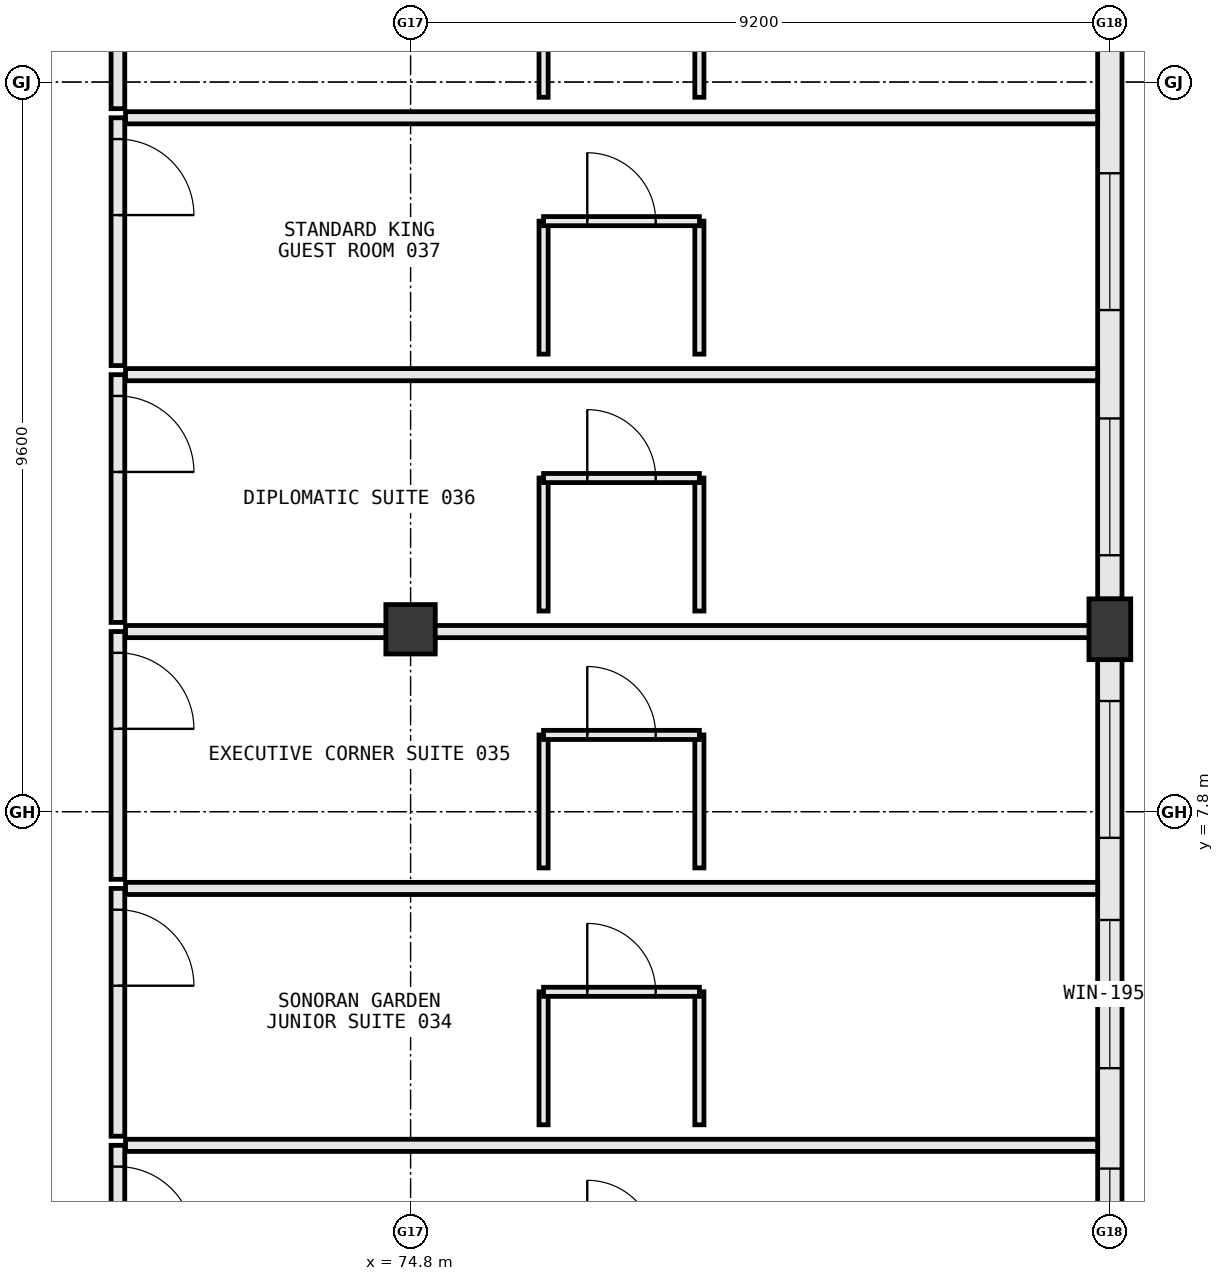
"""IFC4 building model, lengths in metres.
Left out: names, types, materials, properties, quantities, classifications, styles, units other than length and angle.
Written with IfcOpenShell. Run it as: python <this file> out.ifc"""

import sys

from ifc_helpers import new_model, si_unit, direction, frame, frame_2d, origin, origin_2d, place, context, subcontext, project, spatial, rectangle, extrude, element, fill, save


model = new_model("IFC4")
c1 = context("Model", 3, precision=1e-05, world=origin(), true_north=direction((0.0, 1.0)))
c2 = subcontext(c1, "Body", "Model", "MODEL_VIEW")
j1 = project(units=[si_unit("LENGTHUNIT", "METRE"), si_unit("PLANEANGLEUNIT", "RADIAN")], contexts=[c1])
p1 = place(None, origin())
s1 = spatial("IfcSite", under=j1, at=p1, CompositionType="ELEMENT")
p2 = place(p1, origin())
s2 = spatial("IfcBuilding", under=s1, at=p2, CompositionType="ELEMENT")
p3 = place(p2, frame((0.0, 0.0, 10.8)))
s3 = spatial("IfcBuildingStorey", under=s2, at=p3, CompositionType="ELEMENT", Elevation=10.8)
p4 = place(p3, frame((74.8, 10.2, 0.0), z_axis=(0.0, 0.0, 1.0), x_axis=(1.0, 0.0, 0.0)))
e1 = element("IfcColumn", 1, at=p4, inside=s3, PredefinedType="COLUMN", context=c2, shape_type="SweptSolid", body=[
    extrude(rectangle(XDim=0.65, YDim=0.65, at=origin_2d()), origin(), (0.0, 0.0, 1.0), 5.4),
])
p5 = place(p3, frame((84.0, 10.2, 0.0), z_axis=(0.0, 0.0, 1.0), x_axis=(1.0, 0.0, 0.0)))
e2 = element("IfcColumn", 2, at=p5, inside=s3, PredefinedType="PILASTER", context=c2, shape_type="SweptSolid", body=[
    extrude(rectangle(XDim=0.55, YDim=0.8, at=origin_2d()), origin(), (0.0, 0.0, 1.0), 5.4),
])
p6 = place(p3, frame((84.0, 0.998, 0.0), z_axis=(0.0, 0.0, 1.0), x_axis=(0.0, 1.0, 0.0)))
e3 = element("IfcWall", 3, at=p6, inside=s3, PredefinedType="STANDARD", context=c2, shape_type="SweptSolid", body=[
    extrude(rectangle(XDim=8.804, YDim=0.32, at=frame_2d((4.402, 0.0))), origin(), (0.0, 0.0, 1.0), 4.332),
])
p7 = place(p6, frame((3.427, 0.0, 0.85)))
e4 = element("IfcOpeningElement", 4, at=p7, cuts=e3, PredefinedType="OPENING", context=c2, shape_type="SweptSolid", body=[
    extrude(rectangle(XDim=1.95, YDim=1.9, at=frame_2d((0.975, 0.95))), frame((0.0, 0.172, 0.0), z_axis=(0.0, -1.0, 0.0), x_axis=(1.0, 0.0, 0.0)), (0.0, 0.0, 1.0), 0.344),
])
p8 = place(p6, frame((0.306, 0.0, 0.85)))
e5 = element("IfcOpeningElement", 5, at=p8, cuts=e3, PredefinedType="OPENING", context=c2, shape_type="SweptSolid", body=[
    extrude(rectangle(XDim=1.8, YDim=1.85, at=frame_2d((0.9, 0.925))), frame((0.0, 0.172, 0.0), z_axis=(0.0, -1.0, 0.0), x_axis=(1.0, 0.0, 0.0)), (0.0, 0.0, 1.0), 0.344),
])
p9 = place(p6, frame((6.458, 0.0, 0.85)))
e6 = element("IfcOpeningElement", 6, at=p9, cuts=e3, PredefinedType="OPENING", context=c2, shape_type="SweptSolid", body=[
    extrude(rectangle(XDim=1.8, YDim=1.85, at=frame_2d((0.9, 0.925))), frame((0.0, 0.172, 0.0), z_axis=(0.0, -1.0, 0.0), x_axis=(1.0, 0.0, 0.0)), (0.0, 0.0, 1.0), 0.344),
])
p10 = place(p3, frame((84.0, 10.598, 0.0), z_axis=(0.0, 0.0, 1.0), x_axis=(0.0, 1.0, 0.0)))
e7 = element("IfcWall", 7, at=p10, inside=s3, PredefinedType="STANDARD", context=c2, shape_type="SweptSolid", body=[
    extrude(rectangle(XDim=7.604, YDim=0.32, at=frame_2d((3.802, 0.0))), origin(), (0.0, 0.0, 1.0), 4.332),
])
p11 = place(p10, frame((0.576, 0.0, 0.85)))
e8 = element("IfcOpeningElement", 8, at=p11, cuts=e7, PredefinedType="OPENING", context=c2, shape_type="SweptSolid", body=[
    extrude(rectangle(XDim=1.8, YDim=1.85, at=frame_2d((0.9, 0.925))), frame((0.0, 0.172, 0.0), z_axis=(0.0, -1.0, 0.0), x_axis=(1.0, 0.0, 0.0)), (0.0, 0.0, 1.0), 0.344),
])
p12 = place(p10, frame((3.802, 0.0, 0.85)))
e9 = element("IfcOpeningElement", 9, at=p12, cuts=e7, PredefinedType="OPENING", context=c2, shape_type="SweptSolid", body=[
    extrude(rectangle(XDim=1.8, YDim=1.85, at=frame_2d((0.9, 0.925))), frame((0.0, 0.172, 0.0), z_axis=(0.0, -1.0, 0.0), x_axis=(1.0, 0.0, 0.0)), (0.0, 0.0, 1.0), 0.344),
])
p13 = place(p3, frame((70.95, 3.41, 0.0), z_axis=(0.0, 0.0, 1.0), x_axis=(0.0, -1.0, 0.0)))
e10 = element("IfcWall", 10, at=p13, inside=s3, PredefinedType="PARTITIONING", context=c2, shape_type="SweptSolid", body=[
    extrude(rectangle(XDim=3.26, YDim=0.18, at=frame_2d((1.63, 0.0))), origin(), (0.0, 0.0, 1.0), 4.8),
])
p14 = place(p13, frame((0.28, 0.0, 0.0)))
e11 = element("IfcOpeningElement", 11, at=p14, cuts=e10, PredefinedType="OPENING", context=c2, shape_type="SweptSolid", body=[
    extrude(rectangle(XDim=1.0, YDim=2.2, at=frame_2d((0.5, 1.1))), frame((0.0, 0.102, 0.0), z_axis=(0.0, -1.0, 0.0), x_axis=(1.0, 0.0, 0.0)), (0.0, 0.0, 1.0), 0.204),
])
p15 = place(p3, frame((71.05, 3.41, 0.0), z_axis=(0.0, 0.0, 1.0), x_axis=(1.0, 0.0, 0.0)))
e12 = element("IfcWall", 12, at=p15, inside=s3, PredefinedType="PARTITIONING", context=c2, shape_type="SweptSolid", body=[
    extrude(rectangle(XDim=12.79, YDim=0.16, at=frame_2d((6.395, 0.0))), origin(), (0.0, 0.0, 1.0), 4.8),
])
p16 = place(p3, frame((70.95, 6.79, 0.0), z_axis=(0.0, 0.0, 1.0), x_axis=(0.0, -1.0, 0.0)))
e13 = element("IfcWall", 13, at=p16, inside=s3, PredefinedType="PARTITIONING", context=c2, shape_type="SweptSolid", body=[
    extrude(rectangle(XDim=3.26, YDim=0.18, at=frame_2d((1.63, 0.0))), origin(), (0.0, 0.0, 1.0), 4.8),
])
p17 = place(p16, frame((0.28, 0.0, 0.0)))
e14 = element("IfcOpeningElement", 14, at=p17, cuts=e13, PredefinedType="OPENING", context=c2, shape_type="SweptSolid", body=[
    extrude(rectangle(XDim=1.0, YDim=2.2, at=frame_2d((0.5, 1.1))), frame((0.0, 0.102, 0.0), z_axis=(0.0, -1.0, 0.0), x_axis=(1.0, 0.0, 0.0)), (0.0, 0.0, 1.0), 0.204),
])
p18 = place(p3, frame((71.05, 6.79, 0.0), z_axis=(0.0, 0.0, 1.0), x_axis=(1.0, 0.0, 0.0)))
e15 = element("IfcWall", 15, at=p18, inside=s3, PredefinedType="PARTITIONING", context=c2, shape_type="SweptSolid", body=[
    extrude(rectangle(XDim=12.79, YDim=0.16, at=frame_2d((6.395, 0.0))), origin(), (0.0, 0.0, 1.0), 4.8),
])
for number, where, z_axis, x_axis in (
    (16, (76.55, 3.68, 0.0), (0.0, 0.0, 1.0), (0.0, 1.0, 0.0)),
    (17, (78.6, 3.68, 0.0), (0.0, 0.0, 1.0), (0.0, 1.0, 0.0)),
):
    element("IfcWall", number, at=place(p3, frame(where, z_axis=z_axis, x_axis=x_axis)), inside=s3, PredefinedType="PARTITIONING", context=c2, shape_type="SweptSolid", body=[
        extrude(rectangle(XDim=1.75, YDim=0.12, at=frame_2d((0.875, 0.0))), origin(), (0.0, 0.0, 1.0), 4.8),
    ])
p19 = place(p3, frame((76.55, 5.43, 0.0), z_axis=(0.0, 0.0, 1.0), x_axis=(1.0, 0.0, 0.0)))
e18 = element("IfcWall", 18, at=p19, inside=s3, PredefinedType="PARTITIONING", context=c2, shape_type="SweptSolid", body=[
    extrude(rectangle(XDim=2.05, YDim=0.12, at=frame_2d((1.025, 0.0))), origin(), (0.0, 0.0, 1.0), 4.8),
])
p20 = place(p19, frame((0.575, 0.0, 0.0)))
e19 = element("IfcOpeningElement", 19, at=p20, cuts=e18, PredefinedType="OPENING", context=c2, shape_type="SweptSolid", body=[
    extrude(rectangle(XDim=0.9, YDim=2.15, at=frame_2d((0.45, 1.075))), frame((0.0, 0.072, 0.0), z_axis=(0.0, -1.0, 0.0), x_axis=(1.0, 0.0, 0.0)), (0.0, 0.0, 1.0), 0.144),
])
p21 = place(p3, frame((70.95, 10.17, 0.0), z_axis=(0.0, 0.0, 1.0), x_axis=(0.0, -1.0, 0.0)))
e20 = element("IfcWall", 20, at=p21, inside=s3, PredefinedType="PARTITIONING", context=c2, shape_type="SweptSolid", body=[
    extrude(rectangle(XDim=3.26, YDim=0.18, at=frame_2d((1.63, 0.0))), origin(), (0.0, 0.0, 1.0), 4.8),
])
p22 = place(p21, frame((0.28, 0.0, 0.0)))
e21 = element("IfcOpeningElement", 21, at=p22, cuts=e20, PredefinedType="OPENING", context=c2, shape_type="SweptSolid", body=[
    extrude(rectangle(XDim=1.0, YDim=2.2, at=frame_2d((0.5, 1.1))), frame((0.0, 0.102, 0.0), z_axis=(0.0, -1.0, 0.0), x_axis=(1.0, 0.0, 0.0)), (0.0, 0.0, 1.0), 0.204),
])
p23 = place(p3, frame((71.05, 10.17, 0.0), z_axis=(0.0, 0.0, 1.0), x_axis=(1.0, 0.0, 0.0)))
e22 = element("IfcWall", 22, at=p23, inside=s3, PredefinedType="PARTITIONING", context=c2, shape_type="SweptSolid", body=[
    extrude(rectangle(XDim=12.79, YDim=0.16, at=frame_2d((6.395, 0.0))), origin(), (0.0, 0.0, 1.0), 4.175),
])
for number, where, z_axis, x_axis in (
    (23, (76.55, 7.06, 0.0), (0.0, 0.0, 1.0), (0.0, 1.0, 0.0)),
    (24, (78.6, 7.06, 0.0), (0.0, 0.0, 1.0), (0.0, 1.0, 0.0)),
):
    element("IfcWall", number, at=place(p3, frame(where, z_axis=z_axis, x_axis=x_axis)), inside=s3, PredefinedType="PARTITIONING", context=c2, shape_type="SweptSolid", body=[
        extrude(rectangle(XDim=1.75, YDim=0.12, at=frame_2d((0.875, 0.0))), origin(), (0.0, 0.0, 1.0), 4.8),
    ])
p24 = place(p3, frame((76.55, 8.81, 0.0), z_axis=(0.0, 0.0, 1.0), x_axis=(1.0, 0.0, 0.0)))
e25 = element("IfcWall", 25, at=p24, inside=s3, PredefinedType="PARTITIONING", context=c2, shape_type="SweptSolid", body=[
    extrude(rectangle(XDim=2.05, YDim=0.12, at=frame_2d((1.025, 0.0))), origin(), (0.0, 0.0, 1.0), 4.8),
])
p25 = place(p24, frame((0.575, 0.0, 0.0)))
e26 = element("IfcOpeningElement", 26, at=p25, cuts=e25, PredefinedType="OPENING", context=c2, shape_type="SweptSolid", body=[
    extrude(rectangle(XDim=0.9, YDim=2.15, at=frame_2d((0.45, 1.075))), frame((0.0, 0.072, 0.0), z_axis=(0.0, -1.0, 0.0), x_axis=(1.0, 0.0, 0.0)), (0.0, 0.0, 1.0), 0.144),
])
p26 = place(p3, frame((70.95, 13.55, 0.0), z_axis=(0.0, 0.0, 1.0), x_axis=(0.0, -1.0, 0.0)))
e27 = element("IfcWall", 27, at=p26, inside=s3, PredefinedType="PARTITIONING", context=c2, shape_type="SweptSolid", body=[
    extrude(rectangle(XDim=3.26, YDim=0.18, at=frame_2d((1.63, 0.0))), origin(), (0.0, 0.0, 1.0), 4.8),
])
p27 = place(p26, frame((0.28, 0.0, 0.0)))
e28 = element("IfcOpeningElement", 28, at=p27, cuts=e27, PredefinedType="OPENING", context=c2, shape_type="SweptSolid", body=[
    extrude(rectangle(XDim=1.0, YDim=2.2, at=frame_2d((0.5, 1.1))), frame((0.0, 0.102, 0.0), z_axis=(0.0, -1.0, 0.0), x_axis=(1.0, 0.0, 0.0)), (0.0, 0.0, 1.0), 0.204),
])
p28 = place(p3, frame((71.05, 13.55, 0.0), z_axis=(0.0, 0.0, 1.0), x_axis=(1.0, 0.0, 0.0)))
e29 = element("IfcWall", 29, at=p28, inside=s3, PredefinedType="PARTITIONING", context=c2, shape_type="SweptSolid", body=[
    extrude(rectangle(XDim=12.79, YDim=0.16, at=frame_2d((6.395, 0.0))), origin(), (0.0, 0.0, 1.0), 4.8),
])
for number, where, z_axis, x_axis in (
    (30, (76.55, 10.44, 0.0), (0.0, 0.0, 1.0), (0.0, 1.0, 0.0)),
    (31, (78.6, 10.44, 0.0), (0.0, 0.0, 1.0), (0.0, 1.0, 0.0)),
):
    element("IfcWall", number, at=place(p3, frame(where, z_axis=z_axis, x_axis=x_axis)), inside=s3, PredefinedType="PARTITIONING", context=c2, shape_type="SweptSolid", body=[
        extrude(rectangle(XDim=1.75, YDim=0.12, at=frame_2d((0.875, 0.0))), origin(), (0.0, 0.0, 1.0), 4.8),
    ])
p29 = place(p3, frame((76.55, 12.19, 0.0), z_axis=(0.0, 0.0, 1.0), x_axis=(1.0, 0.0, 0.0)))
e32 = element("IfcWall", 32, at=p29, inside=s3, PredefinedType="PARTITIONING", context=c2, shape_type="SweptSolid", body=[
    extrude(rectangle(XDim=2.05, YDim=0.12, at=frame_2d((1.025, 0.0))), origin(), (0.0, 0.0, 1.0), 4.8),
])
p30 = place(p29, frame((0.575, 0.0, 0.0)))
e33 = element("IfcOpeningElement", 33, at=p30, cuts=e32, PredefinedType="OPENING", context=c2, shape_type="SweptSolid", body=[
    extrude(rectangle(XDim=0.9, YDim=2.15, at=frame_2d((0.45, 1.075))), frame((0.0, 0.072, 0.0), z_axis=(0.0, -1.0, 0.0), x_axis=(1.0, 0.0, 0.0)), (0.0, 0.0, 1.0), 0.144),
])
p31 = place(p3, frame((70.95, 16.93, 0.0), z_axis=(0.0, 0.0, 1.0), x_axis=(0.0, -1.0, 0.0)))
e34 = element("IfcWall", 34, at=p31, inside=s3, PredefinedType="PARTITIONING", context=c2, shape_type="SweptSolid", body=[
    extrude(rectangle(XDim=3.26, YDim=0.18, at=frame_2d((1.63, 0.0))), origin(), (0.0, 0.0, 1.0), 4.8),
])
p32 = place(p31, frame((0.28, 0.0, 0.0)))
e35 = element("IfcOpeningElement", 35, at=p32, cuts=e34, PredefinedType="OPENING", context=c2, shape_type="SweptSolid", body=[
    extrude(rectangle(XDim=1.0, YDim=2.2, at=frame_2d((0.5, 1.1))), frame((0.0, 0.102, 0.0), z_axis=(0.0, -1.0, 0.0), x_axis=(1.0, 0.0, 0.0)), (0.0, 0.0, 1.0), 0.204),
])
p33 = place(p3, frame((71.05, 16.93, 0.0), z_axis=(0.0, 0.0, 1.0), x_axis=(1.0, 0.0, 0.0)))
e36 = element("IfcWall", 36, at=p33, inside=s3, PredefinedType="PARTITIONING", context=c2, shape_type="SweptSolid", body=[
    extrude(rectangle(XDim=12.79, YDim=0.16, at=frame_2d((6.395, 0.0))), origin(), (0.0, 0.0, 1.0), 4.8),
])
for number, where, z_axis, x_axis in (
    (37, (76.55, 13.82, 0.0), (0.0, 0.0, 1.0), (0.0, 1.0, 0.0)),
    (38, (78.6, 13.82, 0.0), (0.0, 0.0, 1.0), (0.0, 1.0, 0.0)),
):
    element("IfcWall", number, at=place(p3, frame(where, z_axis=z_axis, x_axis=x_axis)), inside=s3, PredefinedType="PARTITIONING", context=c2, shape_type="SweptSolid", body=[
        extrude(rectangle(XDim=1.75, YDim=0.12, at=frame_2d((0.875, 0.0))), origin(), (0.0, 0.0, 1.0), 4.8),
    ])
p34 = place(p3, frame((76.55, 15.57, 0.0), z_axis=(0.0, 0.0, 1.0), x_axis=(1.0, 0.0, 0.0)))
e39 = element("IfcWall", 39, at=p34, inside=s3, PredefinedType="PARTITIONING", context=c2, shape_type="SweptSolid", body=[
    extrude(rectangle(XDim=2.05, YDim=0.12, at=frame_2d((1.025, 0.0))), origin(), (0.0, 0.0, 1.0), 4.8),
])
p35 = place(p34, frame((0.575, 0.0, 0.0)))
e40 = element("IfcOpeningElement", 40, at=p35, cuts=e39, PredefinedType="OPENING", context=c2, shape_type="SweptSolid", body=[
    extrude(rectangle(XDim=0.9, YDim=2.15, at=frame_2d((0.45, 1.075))), frame((0.0, 0.072, 0.0), z_axis=(0.0, -1.0, 0.0), x_axis=(1.0, 0.0, 0.0)), (0.0, 0.0, 1.0), 0.144),
])
p36 = place(p3, frame((70.95, 20.31, 0.0), z_axis=(0.0, 0.0, 1.0), x_axis=(0.0, -1.0, 0.0)))
e41 = element("IfcWall", 41, at=p36, inside=s3, PredefinedType="PARTITIONING", context=c2, shape_type="SweptSolid", body=[
    extrude(rectangle(XDim=3.26, YDim=0.18, at=frame_2d((1.63, 0.0))), origin(), (0.0, 0.0, 1.0), 4.8),
])
p37 = place(p36, frame((0.28, 0.0, 0.0)))
e42 = element("IfcOpeningElement", 42, at=p37, cuts=e41, PredefinedType="OPENING", context=c2, shape_type="SweptSolid", body=[
    extrude(rectangle(XDim=1.0, YDim=2.2, at=frame_2d((0.5, 1.1))), frame((0.0, 0.102, 0.0), z_axis=(0.0, -1.0, 0.0), x_axis=(1.0, 0.0, 0.0)), (0.0, 0.0, 1.0), 0.204),
])
for number, where, z_axis, x_axis in (
    (43, (76.55, 17.2, 0.0), (0.0, 0.0, 1.0), (0.0, 1.0, 0.0)),
    (44, (78.6, 17.2, 0.0), (0.0, 0.0, 1.0), (0.0, 1.0, 0.0)),
):
    element("IfcWall", number, at=place(p3, frame(where, z_axis=z_axis, x_axis=x_axis)), inside=s3, PredefinedType="PARTITIONING", context=c2, shape_type="SweptSolid", body=[
        extrude(rectangle(XDim=1.75, YDim=0.12, at=frame_2d((0.875, 0.0))), origin(), (0.0, 0.0, 1.0), 4.8),
    ])
p38 = place(p7, origin())
e45 = element("IfcWindow", 45, at=p38, inside=s3, PartitioningType="DOUBLE_PANEL_VERTICAL", PredefinedType="WINDOW", context=c2, shape_type="SweptSolid", body=[
    extrude(rectangle(XDim=1.95, YDim=1.9, at=frame_2d((0.975, 0.95))), frame((0.0, 0.03, 0.0), z_axis=(0.0, -1.0, 0.0), x_axis=(1.0, 0.0, 0.0)), (0.0, 0.0, 1.0), 0.06),
])
fill(e4, e45)
p39 = place(p8, origin())
e46 = element("IfcWindow", 46, at=p39, inside=s3, PartitioningType="SINGLE_PANEL", PredefinedType="WINDOW", context=c2, shape_type="SweptSolid", body=[
    extrude(rectangle(XDim=1.8, YDim=1.85, at=frame_2d((0.9, 0.925))), frame((0.0, 0.03, 0.0), z_axis=(0.0, -1.0, 0.0), x_axis=(1.0, 0.0, 0.0)), (0.0, 0.0, 1.0), 0.06),
])
fill(e5, e46)
p40 = place(p9, origin())
e47 = element("IfcWindow", 47, at=p40, inside=s3, PartitioningType="SINGLE_PANEL", PredefinedType="WINDOW", context=c2, shape_type="SweptSolid", body=[
    extrude(rectangle(XDim=1.8, YDim=1.85, at=frame_2d((0.9, 0.925))), frame((0.0, 0.03, 0.0), z_axis=(0.0, -1.0, 0.0), x_axis=(1.0, 0.0, 0.0)), (0.0, 0.0, 1.0), 0.06),
])
fill(e6, e47)
p41 = place(p11, origin())
e48 = element("IfcWindow", 48, at=p41, inside=s3, PartitioningType="SINGLE_PANEL", PredefinedType="WINDOW", context=c2, shape_type="SweptSolid", body=[
    extrude(rectangle(XDim=1.8, YDim=1.85, at=frame_2d((0.9, 0.925))), frame((0.0, 0.03, 0.0), z_axis=(0.0, -1.0, 0.0), x_axis=(1.0, 0.0, 0.0)), (0.0, 0.0, 1.0), 0.06),
])
fill(e8, e48)
p42 = place(p12, origin())
e49 = element("IfcWindow", 49, at=p42, inside=s3, PartitioningType="SINGLE_PANEL", PredefinedType="WINDOW", context=c2, shape_type="SweptSolid", body=[
    extrude(rectangle(XDim=1.8, YDim=1.85, at=frame_2d((0.9, 0.925))), frame((0.0, 0.03, 0.0), z_axis=(0.0, -1.0, 0.0), x_axis=(1.0, 0.0, 0.0)), (0.0, 0.0, 1.0), 0.06),
])
fill(e9, e49)
p43 = place(p14, origin())
e50 = element("IfcDoor", 50, at=p43, inside=s3, OperationType="SINGLE_SWING_RIGHT", PredefinedType="DOOR", context=c2, shape_type="SweptSolid", body=[
    extrude(rectangle(XDim=1.0, YDim=2.2, at=frame_2d((0.5, 1.1))), frame((0.0, 0.025, 0.0), z_axis=(0.0, -1.0, 0.0), x_axis=(1.0, 0.0, 0.0)), (0.0, 0.0, 1.0), 0.05),
])
fill(e11, e50)
p44 = place(p17, origin())
e51 = element("IfcDoor", 51, at=p44, inside=s3, OperationType="SINGLE_SWING_RIGHT", PredefinedType="DOOR", context=c2, shape_type="SweptSolid", body=[
    extrude(rectangle(XDim=1.0, YDim=2.2, at=frame_2d((0.5, 1.1))), frame((0.0, 0.025, 0.0), z_axis=(0.0, -1.0, 0.0), x_axis=(1.0, 0.0, 0.0)), (0.0, 0.0, 1.0), 0.05),
])
fill(e14, e51)
p45 = place(p20, origin())
e52 = element("IfcDoor", 52, at=p45, inside=s3, OperationType="SINGLE_SWING_LEFT", PredefinedType="DOOR", context=c2, shape_type="SweptSolid", body=[
    extrude(rectangle(XDim=0.9, YDim=2.15, at=frame_2d((0.45, 1.075))), frame((0.0, 0.025, 0.0), z_axis=(0.0, -1.0, 0.0), x_axis=(1.0, 0.0, 0.0)), (0.0, 0.0, 1.0), 0.05),
])
fill(e19, e52)
p46 = place(p22, origin())
e53 = element("IfcDoor", 53, at=p46, inside=s3, OperationType="SINGLE_SWING_RIGHT", PredefinedType="DOOR", context=c2, shape_type="SweptSolid", body=[
    extrude(rectangle(XDim=1.0, YDim=2.2, at=frame_2d((0.5, 1.1))), frame((0.0, 0.025, 0.0), z_axis=(0.0, -1.0, 0.0), x_axis=(1.0, 0.0, 0.0)), (0.0, 0.0, 1.0), 0.05),
])
fill(e21, e53)
p47 = place(p25, origin())
e54 = element("IfcDoor", 54, at=p47, inside=s3, OperationType="SINGLE_SWING_LEFT", PredefinedType="DOOR", context=c2, shape_type="SweptSolid", body=[
    extrude(rectangle(XDim=0.9, YDim=2.15, at=frame_2d((0.45, 1.075))), frame((0.0, 0.025, 0.0), z_axis=(0.0, -1.0, 0.0), x_axis=(1.0, 0.0, 0.0)), (0.0, 0.0, 1.0), 0.05),
])
fill(e26, e54)
p48 = place(p27, origin())
e55 = element("IfcDoor", 55, at=p48, inside=s3, OperationType="SINGLE_SWING_RIGHT", PredefinedType="DOOR", context=c2, shape_type="SweptSolid", body=[
    extrude(rectangle(XDim=1.0, YDim=2.2, at=frame_2d((0.5, 1.1))), frame((0.0, 0.025, 0.0), z_axis=(0.0, -1.0, 0.0), x_axis=(1.0, 0.0, 0.0)), (0.0, 0.0, 1.0), 0.05),
])
fill(e28, e55)
p49 = place(p30, origin())
e56 = element("IfcDoor", 56, at=p49, inside=s3, OperationType="SINGLE_SWING_LEFT", PredefinedType="DOOR", context=c2, shape_type="SweptSolid", body=[
    extrude(rectangle(XDim=0.9, YDim=2.15, at=frame_2d((0.45, 1.075))), frame((0.0, 0.025, 0.0), z_axis=(0.0, -1.0, 0.0), x_axis=(1.0, 0.0, 0.0)), (0.0, 0.0, 1.0), 0.05),
])
fill(e33, e56)
p50 = place(p32, origin())
e57 = element("IfcDoor", 57, at=p50, inside=s3, OperationType="SINGLE_SWING_RIGHT", PredefinedType="DOOR", context=c2, shape_type="SweptSolid", body=[
    extrude(rectangle(XDim=1.0, YDim=2.2, at=frame_2d((0.5, 1.1))), frame((0.0, 0.025, 0.0), z_axis=(0.0, -1.0, 0.0), x_axis=(1.0, 0.0, 0.0)), (0.0, 0.0, 1.0), 0.05),
])
fill(e35, e57)
p51 = place(p35, origin())
e58 = element("IfcDoor", 58, at=p51, inside=s3, OperationType="SINGLE_SWING_LEFT", PredefinedType="DOOR", context=c2, shape_type="SweptSolid", body=[
    extrude(rectangle(XDim=0.9, YDim=2.15, at=frame_2d((0.45, 1.075))), frame((0.0, 0.025, 0.0), z_axis=(0.0, -1.0, 0.0), x_axis=(1.0, 0.0, 0.0)), (0.0, 0.0, 1.0), 0.05),
])
fill(e40, e58)
save(model, sys.argv[1])
